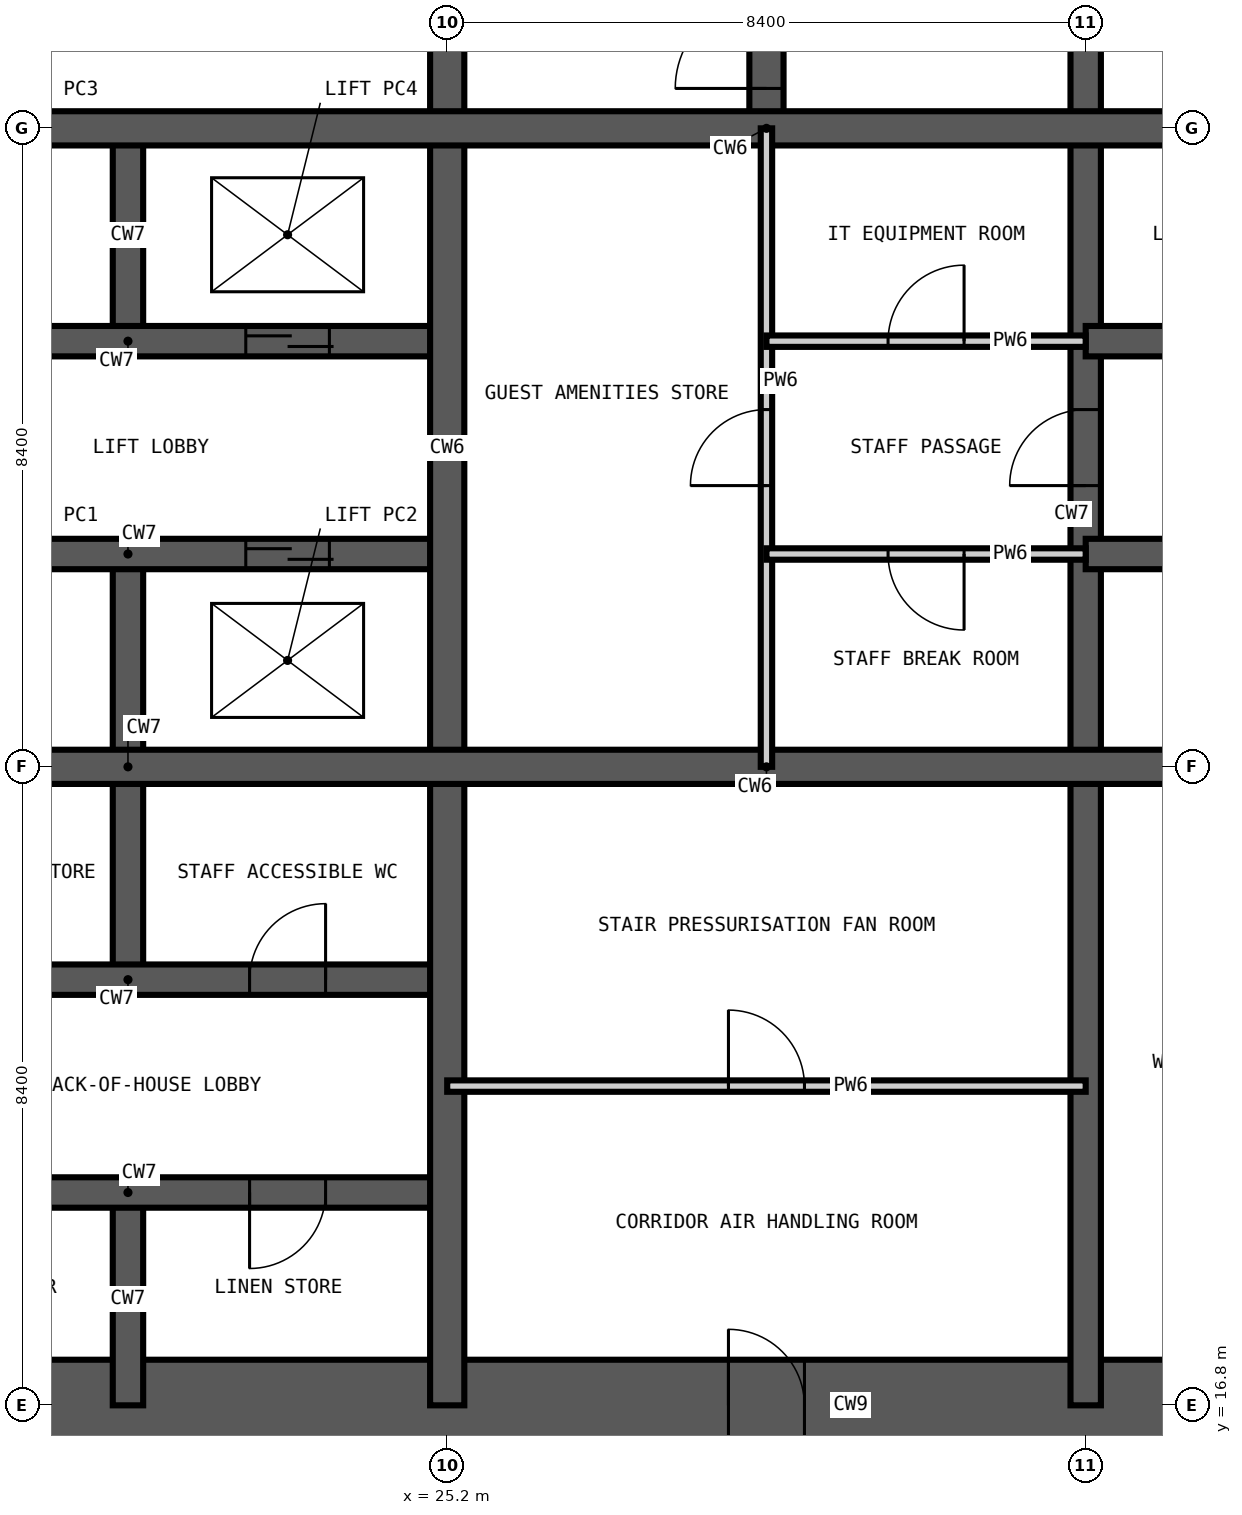
"""IFC4 building model, lengths in metres.
Left out: names, types, materials, properties, quantities, classifications, styles, units other than length and angle.
Written with IfcOpenShell. Run it as: python <this file> out.ifc"""

import sys

from ifc_helpers import new_model, si_unit, direction, frame, frame_2d, origin, place, context, subcontext, project, spatial, rectangle, extrude, element, fill, save


model = new_model("IFC4")
c1 = context("Model", 3, precision=1e-05, world=origin(), true_north=direction((0.0, 1.0)))
c2 = subcontext(c1, "Body", "Model", "MODEL_VIEW")
j1 = project(units=[si_unit("LENGTHUNIT", "METRE"), si_unit("PLANEANGLEUNIT", "RADIAN")], contexts=[c1])
p1 = place(None, origin())
s1 = spatial("IfcSite", under=j1, at=p1, CompositionType="ELEMENT")
p2 = place(p1, origin())
s2 = spatial("IfcBuilding", under=s1, at=p2, CompositionType="ELEMENT")
p3 = place(p2, frame((0.0, 0.0, 213.0)))
s3 = spatial("IfcBuildingStorey", under=s2, at=p3, CompositionType="ELEMENT", Elevation=213.0)
p4 = place(p3, frame((16.2, 16.8, -0.35), z_axis=(0.0, 0.0, 1.0), x_axis=(1.0, 0.0, 0.0)))
e1 = element("IfcWall", 1, at=p4, inside=s3, PredefinedType="SHEAR", context=c2, shape_type="SweptSolid", body=[
    extrude(rectangle(XDim=26.4, YDim=1.2, at=frame_2d((13.2, 0.0))), origin(), (0.0, 0.0, 1.0), 3.6),
])
p5 = place(p4, frame((12.7, 0.0, 0.35)))
e2 = element("IfcOpeningElement", 2, at=p5, cuts=e1, PredefinedType="OPENING", context=c2, shape_type="SweptSolid", body=[
    extrude(rectangle(XDim=1.0, YDim=2.1, at=frame_2d((0.5, 1.05))), frame((0.0, 0.61, 0.0), z_axis=(0.0, -1.0, 0.0), x_axis=(1.0, 0.0, 0.0)), (0.0, 0.0, 1.0), 1.22),
])
p6 = place(p4, frame((19.0, 0.0, 0.35)))
e3 = element("IfcOpeningElement", 3, at=p6, cuts=e1, PredefinedType="OPENING", context=c2, shape_type="SweptSolid", body=[
    extrude(rectangle(XDim=1.0, YDim=2.1, at=frame_2d((0.5, 1.05))), frame((0.0, 0.61, 0.0), z_axis=(0.0, -1.0, 0.0), x_axis=(1.0, 0.0, 0.0)), (0.0, 0.0, 1.0), 1.22),
])
p7 = place(p3, frame((21.0, 16.8, -0.35), z_axis=(0.0, 0.0, 1.0), x_axis=(0.0, 1.0, 0.0)))
e4 = element("IfcWall", 4, at=p7, inside=s3, PredefinedType="SHEAR", context=c2, shape_type="SweptSolid", body=[
    extrude(rectangle(XDim=2.8, YDim=0.4, at=frame_2d((1.4, 0.0))), origin(), (0.0, 0.0, 1.0), 3.6),
])
p8 = place(p3, frame((21.0, 22.4, -0.35), z_axis=(0.0, 0.0, 1.0), x_axis=(0.0, 1.0, 0.0)))
e5 = element("IfcWall", 5, at=p8, inside=s3, PredefinedType="SHEAR", context=c2, shape_type="SweptSolid", body=[
    extrude(rectangle(XDim=5.6, YDim=0.4, at=frame_2d((2.8, 0.0))), origin(), (0.0, 0.0, 1.0), 3.6),
])
p9 = place(p3, frame((21.0, 30.8, -0.35), z_axis=(0.0, 0.0, 1.0), x_axis=(0.0, 1.0, 0.0)))
e6 = element("IfcWall", 6, at=p9, inside=s3, PredefinedType="SHEAR", context=c2, shape_type="SweptSolid", body=[
    extrude(rectangle(XDim=2.8, YDim=0.4, at=frame_2d((1.4, 0.0))), origin(), (0.0, 0.0, 1.0), 3.6),
])
p10 = place(p3, frame((33.6, 16.8, -0.35), z_axis=(0.0, 0.0, 1.0), x_axis=(0.0, 1.0, 0.0)))
e7 = element("IfcWall", 7, at=p10, inside=s3, PredefinedType="SHEAR", context=c2, shape_type="SweptSolid", body=[
    extrude(rectangle(XDim=25.2, YDim=0.4, at=frame_2d((12.6, 0.0))), origin(), (0.0, 0.0, 1.0), 3.6),
])
p11 = place(p10, frame((22.5, 0.0, 0.35)))
e8 = element("IfcOpeningElement", 8, at=p11, cuts=e7, PredefinedType="OPENING", context=c2, shape_type="SweptSolid", body=[
    extrude(rectangle(XDim=1.2, YDim=2.2, at=frame_2d((0.6, 1.1))), frame((0.0, 0.21, 0.0), z_axis=(0.0, -1.0, 0.0), x_axis=(1.0, 0.0, 0.0)), (0.0, 0.0, 1.0), 0.42),
])
p12 = place(p10, frame((18.3, 0.0, 0.35)))
e9 = element("IfcOpeningElement", 9, at=p12, cuts=e7, PredefinedType="OPENING", context=c2, shape_type="SweptSolid", body=[
    extrude(rectangle(XDim=1.2, YDim=2.2, at=frame_2d((0.6, 1.1))), frame((0.0, 0.21, 0.0), z_axis=(0.0, -1.0, 0.0), x_axis=(1.0, 0.0, 0.0)), (0.0, 0.0, 1.0), 0.42),
])
p13 = place(p10, frame((12.1, 0.0, 0.35)))
e10 = element("IfcOpeningElement", 10, at=p13, cuts=e7, PredefinedType="OPENING", context=c2, shape_type="SweptSolid", body=[
    extrude(rectangle(XDim=1.0, YDim=2.1, at=frame_2d((0.5, 1.05))), frame((0.0, 0.21, 0.0), z_axis=(0.0, -1.0, 0.0), x_axis=(1.0, 0.0, 0.0)), (0.0, 0.0, 1.0), 0.42),
])
p14 = place(p3, frame((16.8, 19.6, -0.35), z_axis=(0.0, 0.0, 1.0), x_axis=(1.0, 0.0, 0.0)))
e11 = element("IfcWall", 11, at=p14, inside=s3, PredefinedType="SHEAR", context=c2, shape_type="SweptSolid", body=[
    extrude(rectangle(XDim=8.4, YDim=0.4, at=frame_2d((4.2, 0.0))), origin(), (0.0, 0.0, 1.0), 3.6),
])
p15 = place(p14, frame((1.6, 0.0, 0.35)))
e12 = element("IfcOpeningElement", 12, at=p15, cuts=e11, PredefinedType="OPENING", context=c2, shape_type="SweptSolid", body=[
    extrude(rectangle(XDim=1.0, YDim=2.1, at=frame_2d((0.5, 1.05))), frame((0.0, 0.21, 0.0), z_axis=(0.0, -1.0, 0.0), x_axis=(1.0, 0.0, 0.0)), (0.0, 0.0, 1.0), 0.42),
])
p16 = place(p14, frame((5.8, 0.0, 0.35)))
e13 = element("IfcOpeningElement", 13, at=p16, cuts=e11, PredefinedType="OPENING", context=c2, shape_type="SweptSolid", body=[
    extrude(rectangle(XDim=1.0, YDim=2.1, at=frame_2d((0.5, 1.05))), frame((0.0, 0.21, 0.0), z_axis=(0.0, -1.0, 0.0), x_axis=(1.0, 0.0, 0.0)), (0.0, 0.0, 1.0), 0.42),
])
p17 = place(p3, frame((16.8, 22.4, -0.35), z_axis=(0.0, 0.0, 1.0), x_axis=(1.0, 0.0, 0.0)))
e14 = element("IfcWall", 14, at=p17, inside=s3, PredefinedType="SHEAR", context=c2, shape_type="SweptSolid", body=[
    extrude(rectangle(XDim=8.4, YDim=0.4, at=frame_2d((4.2, 0.0))), origin(), (0.0, 0.0, 1.0), 3.6),
])
p18 = place(p17, frame((1.6, 0.0, 0.35)))
e15 = element("IfcOpeningElement", 15, at=p18, cuts=e14, PredefinedType="OPENING", context=c2, shape_type="SweptSolid", body=[
    extrude(rectangle(XDim=1.0, YDim=2.1, at=frame_2d((0.5, 1.05))), frame((0.0, 0.21, 0.0), z_axis=(0.0, -1.0, 0.0), x_axis=(1.0, 0.0, 0.0)), (0.0, 0.0, 1.0), 0.42),
])
p19 = place(p17, frame((5.8, 0.0, 0.35)))
e16 = element("IfcOpeningElement", 16, at=p19, cuts=e14, PredefinedType="OPENING", context=c2, shape_type="SweptSolid", body=[
    extrude(rectangle(XDim=1.0, YDim=2.1, at=frame_2d((0.5, 1.05))), frame((0.0, 0.21, 0.0), z_axis=(0.0, -1.0, 0.0), x_axis=(1.0, 0.0, 0.0)), (0.0, 0.0, 1.0), 0.42),
])
p20 = place(p3, frame((16.8, 28.0, -0.35), z_axis=(0.0, 0.0, 1.0), x_axis=(1.0, 0.0, 0.0)))
e17 = element("IfcWall", 17, at=p20, inside=s3, PredefinedType="SHEAR", context=c2, shape_type="SweptSolid", body=[
    extrude(rectangle(XDim=8.4, YDim=0.4, at=frame_2d((4.2, 0.0))), origin(), (0.0, 0.0, 1.0), 3.6),
])
p21 = place(p20, frame((1.55, 0.0, 0.35)))
e18 = element("IfcOpeningElement", 18, at=p21, cuts=e17, PredefinedType="OPENING", context=c2, shape_type="SweptSolid", body=[
    extrude(rectangle(XDim=1.1, YDim=2.2, at=frame_2d((0.55, 1.1))), frame((0.0, 0.21, 0.0), z_axis=(0.0, -1.0, 0.0), x_axis=(1.0, 0.0, 0.0)), (0.0, 0.0, 1.0), 0.42),
])
p22 = place(p20, frame((5.75, 0.0, 0.35)))
e19 = element("IfcOpeningElement", 19, at=p22, cuts=e17, PredefinedType="OPENING", context=c2, shape_type="SweptSolid", body=[
    extrude(rectangle(XDim=1.1, YDim=2.2, at=frame_2d((0.55, 1.1))), frame((0.0, 0.21, 0.0), z_axis=(0.0, -1.0, 0.0), x_axis=(1.0, 0.0, 0.0)), (0.0, 0.0, 1.0), 0.42),
])
p23 = place(p3, frame((33.6, 28.0, -0.35), z_axis=(0.0, 0.0, 1.0), x_axis=(1.0, 0.0, 0.0)))
e20 = element("IfcWall", 20, at=p23, inside=s3, PredefinedType="SHEAR", context=c2, shape_type="SweptSolid", body=[
    extrude(rectangle(XDim=8.4, YDim=0.4, at=frame_2d((4.2, 0.0))), origin(), (0.0, 0.0, 1.0), 3.6),
])
p24 = place(p23, frame((1.6, 0.0, 0.35)))
e21 = element("IfcOpeningElement", 21, at=p24, cuts=e20, PredefinedType="OPENING", context=c2, shape_type="SweptSolid", body=[
    extrude(rectangle(XDim=1.0, YDim=2.1, at=frame_2d((0.5, 1.05))), frame((0.0, 0.21, 0.0), z_axis=(0.0, -1.0, 0.0), x_axis=(1.0, 0.0, 0.0)), (0.0, 0.0, 1.0), 0.42),
])
p25 = place(p23, frame((4.6, 0.0, 0.35)))
e22 = element("IfcOpeningElement", 22, at=p25, cuts=e20, PredefinedType="OPENING", context=c2, shape_type="SweptSolid", body=[
    extrude(rectangle(XDim=1.0, YDim=2.1, at=frame_2d((0.5, 1.05))), frame((0.0, 0.21, 0.0), z_axis=(0.0, -1.0, 0.0), x_axis=(1.0, 0.0, 0.0)), (0.0, 0.0, 1.0), 0.42),
])
p26 = place(p3, frame((16.8, 30.8, -0.35), z_axis=(0.0, 0.0, 1.0), x_axis=(1.0, 0.0, 0.0)))
e23 = element("IfcWall", 23, at=p26, inside=s3, PredefinedType="SHEAR", context=c2, shape_type="SweptSolid", body=[
    extrude(rectangle(XDim=8.4, YDim=0.4, at=frame_2d((4.2, 0.0))), origin(), (0.0, 0.0, 1.0), 3.6),
])
p27 = place(p26, frame((1.55, 0.0, 0.35)))
e24 = element("IfcOpeningElement", 24, at=p27, cuts=e23, PredefinedType="OPENING", context=c2, shape_type="SweptSolid", body=[
    extrude(rectangle(XDim=1.1, YDim=2.2, at=frame_2d((0.55, 1.1))), frame((0.0, 0.21, 0.0), z_axis=(0.0, -1.0, 0.0), x_axis=(1.0, 0.0, 0.0)), (0.0, 0.0, 1.0), 0.42),
])
p28 = place(p26, frame((5.75, 0.0, 0.35)))
e25 = element("IfcOpeningElement", 25, at=p28, cuts=e23, PredefinedType="OPENING", context=c2, shape_type="SweptSolid", body=[
    extrude(rectangle(XDim=1.1, YDim=2.2, at=frame_2d((0.55, 1.1))), frame((0.0, 0.21, 0.0), z_axis=(0.0, -1.0, 0.0), x_axis=(1.0, 0.0, 0.0)), (0.0, 0.0, 1.0), 0.42),
])
p29 = place(p3, frame((33.6, 30.8, -0.35), z_axis=(0.0, 0.0, 1.0), x_axis=(1.0, 0.0, 0.0)))
e26 = element("IfcWall", 26, at=p29, inside=s3, PredefinedType="SHEAR", context=c2, shape_type="SweptSolid", body=[
    extrude(rectangle(XDim=8.4, YDim=0.4, at=frame_2d((4.2, 0.0))), origin(), (0.0, 0.0, 1.0), 3.6),
])
p30 = place(p3, frame((25.2, 16.8, -0.35), z_axis=(0.0, 0.0, 1.0), x_axis=(0.0, 1.0, 0.0)))
e27 = element("IfcWall", 27, at=p30, inside=s3, PredefinedType="SHEAR", context=c2, shape_type="SweptSolid", body=[
    extrude(rectangle(XDim=25.2, YDim=0.45, at=frame_2d((12.6, 0.0))), origin(), (0.0, 0.0, 1.0), 3.6),
])
p31 = place(p3, frame((29.4, 33.6, -0.35), z_axis=(0.0, 0.0, 1.0), x_axis=(0.0, 1.0, 0.0)))
e28 = element("IfcWall", 28, at=p31, inside=s3, PredefinedType="SHEAR", context=c2, shape_type="SweptSolid", body=[
    extrude(rectangle(XDim=8.4, YDim=0.45, at=frame_2d((4.2, 0.0))), origin(), (0.0, 0.0, 1.0), 3.6),
])
p32 = place(p31, frame((0.525, 0.0, 0.35)))
e29 = element("IfcOpeningElement", 29, at=p32, cuts=e28, PredefinedType="OPENING", context=c2, shape_type="SweptSolid", body=[
    extrude(rectangle(XDim=1.2, YDim=2.2, at=frame_2d((0.6, 1.1))), frame((0.0, 0.235, 0.0), z_axis=(0.0, -1.0, 0.0), x_axis=(1.0, 0.0, 0.0)), (0.0, 0.0, 1.0), 0.47),
])
for number, where, z_axis, x_axis in (
    (30, (16.8, 25.2, -0.35), (0.0, 0.0, 1.0), (1.0, 0.0, 0.0)),
    (31, (16.8, 33.6, -0.35), (0.0, 0.0, 1.0), (1.0, 0.0, 0.0)),
):
    element("IfcWall", number, at=place(p3, frame(where, z_axis=z_axis, x_axis=x_axis)), inside=s3, PredefinedType="SHEAR", context=c2, shape_type="SweptSolid", body=[
        extrude(rectangle(XDim=25.2, YDim=0.45, at=frame_2d((12.6, 0.0))), origin(), (0.0, 0.0, 1.0), 3.6),
    ])
p33 = place(p3, frame((29.4, 25.2, 0.0), z_axis=(0.0, 0.0, 1.0), x_axis=(0.0, 1.0, 0.0)))
e32 = element("IfcWall", 32, at=p33, inside=s3, PredefinedType="PARTITIONING", context=c2, shape_type="SweptSolid", body=[
    extrude(rectangle(XDim=8.4, YDim=0.15, at=frame_2d((4.2, 0.0))), origin(), (0.0, 0.0, 1.0), 3.25),
])
p34 = place(p33, frame((3.7, 0.0, 0.0)))
e33 = element("IfcOpeningElement", 33, at=p34, cuts=e32, PredefinedType="OPENING", context=c2, shape_type="SweptSolid", body=[
    extrude(rectangle(XDim=1.0, YDim=2.1, at=frame_2d((0.5, 1.05))), frame((0.0, 0.085, 0.0), z_axis=(0.0, -1.0, 0.0), x_axis=(1.0, 0.0, 0.0)), (0.0, 0.0, 1.0), 0.17),
])
p35 = place(p3, frame((25.2, 21.0, 0.0), z_axis=(0.0, 0.0, 1.0), x_axis=(1.0, 0.0, 0.0)))
e34 = element("IfcWall", 34, at=p35, inside=s3, PredefinedType="PARTITIONING", context=c2, shape_type="SweptSolid", body=[
    extrude(rectangle(XDim=8.4, YDim=0.15, at=frame_2d((4.2, 0.0))), origin(), (0.0, 0.0, 1.0), 3.25),
])
p36 = place(p35, frame((3.7, 0.0, 0.0)))
e35 = element("IfcOpeningElement", 35, at=p36, cuts=e34, PredefinedType="OPENING", context=c2, shape_type="SweptSolid", body=[
    extrude(rectangle(XDim=1.0, YDim=2.1, at=frame_2d((0.5, 1.05))), frame((0.0, 0.085, 0.0), z_axis=(0.0, -1.0, 0.0), x_axis=(1.0, 0.0, 0.0)), (0.0, 0.0, 1.0), 0.17),
])
p37 = place(p3, frame((29.4, 28.0, 0.0), z_axis=(0.0, 0.0, 1.0), x_axis=(1.0, 0.0, 0.0)))
e36 = element("IfcWall", 36, at=p37, inside=s3, PredefinedType="PARTITIONING", context=c2, shape_type="SweptSolid", body=[
    extrude(rectangle(XDim=4.2, YDim=0.15, at=frame_2d((2.1, 0.0))), origin(), (0.0, 0.0, 1.0), 3.25),
])
p38 = place(p37, frame((1.6, 0.0, 0.0)))
e37 = element("IfcOpeningElement", 37, at=p38, cuts=e36, PredefinedType="OPENING", context=c2, shape_type="SweptSolid", body=[
    extrude(rectangle(XDim=1.0, YDim=2.1, at=frame_2d((0.5, 1.05))), frame((0.0, 0.085, 0.0), z_axis=(0.0, -1.0, 0.0), x_axis=(1.0, 0.0, 0.0)), (0.0, 0.0, 1.0), 0.17),
])
p39 = place(p3, frame((29.4, 30.8, 0.0), z_axis=(0.0, 0.0, 1.0), x_axis=(1.0, 0.0, 0.0)))
e38 = element("IfcWall", 38, at=p39, inside=s3, PredefinedType="PARTITIONING", context=c2, shape_type="SweptSolid", body=[
    extrude(rectangle(XDim=4.2, YDim=0.15, at=frame_2d((2.1, 0.0))), origin(), (0.0, 0.0, 1.0), 3.25),
])
p40 = place(p39, frame((1.6, 0.0, 0.0)))
e39 = element("IfcOpeningElement", 39, at=p40, cuts=e38, PredefinedType="OPENING", context=c2, shape_type="SweptSolid", body=[
    extrude(rectangle(XDim=1.0, YDim=2.1, at=frame_2d((0.5, 1.05))), frame((0.0, 0.085, 0.0), z_axis=(0.0, -1.0, 0.0), x_axis=(1.0, 0.0, 0.0)), (0.0, 0.0, 1.0), 0.17),
])
p41 = place(p32, origin())
e40 = element("IfcDoor", 40, at=p41, inside=s3, OperationType="SINGLE_SWING_LEFT", PredefinedType="DOOR", context=c2, shape_type="SweptSolid", body=[
    extrude(rectangle(XDim=1.2, YDim=2.2, at=frame_2d((0.6, 1.1))), frame((0.0, 0.025, 0.0), z_axis=(0.0, -1.0, 0.0), x_axis=(1.0, 0.0, 0.0)), (0.0, 0.0, 1.0), 0.05),
])
fill(e29, e40)
p42 = place(p22, origin())
e41 = element("IfcDoor", 41, at=p42, inside=s3, OperationType="DOUBLE_DOOR_SLIDING", PredefinedType="DOOR", context=c2, shape_type="SweptSolid", body=[
    extrude(rectangle(XDim=1.1, YDim=2.2, at=frame_2d((0.55, 1.1))), frame((0.0, 0.025, 0.0), z_axis=(0.0, -1.0, 0.0), x_axis=(1.0, 0.0, 0.0)), (0.0, 0.0, 1.0), 0.05),
])
fill(e19, e41)
p43 = place(p28, origin())
e42 = element("IfcDoor", 42, at=p43, inside=s3, OperationType="DOUBLE_DOOR_SLIDING", PredefinedType="DOOR", context=c2, shape_type="SweptSolid", body=[
    extrude(rectangle(XDim=1.1, YDim=2.2, at=frame_2d((0.55, 1.1))), frame((0.0, 0.025, 0.0), z_axis=(0.0, -1.0, 0.0), x_axis=(1.0, 0.0, 0.0)), (0.0, 0.0, 1.0), 0.05),
])
fill(e25, e42)
p44 = place(p16, frame((1.0, 0.0, 0.0), z_axis=(0.0, 0.0, 1.0), x_axis=(-1.0, 0.0, 0.0)))
e43 = element("IfcDoor", 43, at=p44, inside=s3, OperationType="SINGLE_SWING_RIGHT", PredefinedType="DOOR", context=c2, shape_type="SweptSolid", body=[
    extrude(rectangle(XDim=1.0, YDim=2.1, at=frame_2d((0.5, 1.05))), frame((0.0, 0.025, 0.0), z_axis=(0.0, -1.0, 0.0), x_axis=(1.0, 0.0, 0.0)), (0.0, 0.0, 1.0), 0.05),
])
fill(e13, e43)
p45 = place(p19, origin())
e44 = element("IfcDoor", 44, at=p45, inside=s3, OperationType="SINGLE_SWING_RIGHT", PredefinedType="DOOR", context=c2, shape_type="SweptSolid", body=[
    extrude(rectangle(XDim=1.0, YDim=2.1, at=frame_2d((0.5, 1.05))), frame((0.0, 0.025, 0.0), z_axis=(0.0, -1.0, 0.0), x_axis=(1.0, 0.0, 0.0)), (0.0, 0.0, 1.0), 0.05),
])
fill(e16, e44)
p46 = place(p13, origin())
e45 = element("IfcDoor", 45, at=p46, inside=s3, OperationType="SINGLE_SWING_LEFT", PredefinedType="DOOR", context=c2, shape_type="SweptSolid", body=[
    extrude(rectangle(XDim=1.0, YDim=2.1, at=frame_2d((0.5, 1.05))), frame((0.0, 0.025, 0.0), z_axis=(0.0, -1.0, 0.0), x_axis=(1.0, 0.0, 0.0)), (0.0, 0.0, 1.0), 0.05),
])
fill(e10, e45)
p47 = place(p38, frame((1.0, 0.0, 0.0), z_axis=(0.0, 0.0, 1.0), x_axis=(-1.0, 0.0, 0.0)))
e46 = element("IfcDoor", 46, at=p47, inside=s3, OperationType="SINGLE_SWING_LEFT", PredefinedType="DOOR", context=c2, shape_type="SweptSolid", body=[
    extrude(rectangle(XDim=1.0, YDim=2.1, at=frame_2d((0.5, 1.05))), frame((0.0, 0.025, 0.0), z_axis=(0.0, -1.0, 0.0), x_axis=(1.0, 0.0, 0.0)), (0.0, 0.0, 1.0), 0.05),
])
fill(e37, e46)
p48 = place(p40, origin())
e47 = element("IfcDoor", 47, at=p48, inside=s3, OperationType="SINGLE_SWING_RIGHT", PredefinedType="DOOR", context=c2, shape_type="SweptSolid", body=[
    extrude(rectangle(XDim=1.0, YDim=2.1, at=frame_2d((0.5, 1.05))), frame((0.0, 0.025, 0.0), z_axis=(0.0, -1.0, 0.0), x_axis=(1.0, 0.0, 0.0)), (0.0, 0.0, 1.0), 0.05),
])
fill(e39, e47)
p49 = place(p34, origin())
e48 = element("IfcDoor", 48, at=p49, inside=s3, OperationType="SINGLE_SWING_LEFT", PredefinedType="DOOR", context=c2, shape_type="SweptSolid", body=[
    extrude(rectangle(XDim=1.0, YDim=2.1, at=frame_2d((0.5, 1.05))), frame((0.0, 0.025, 0.0), z_axis=(0.0, -1.0, 0.0), x_axis=(1.0, 0.0, 0.0)), (0.0, 0.0, 1.0), 0.05),
])
fill(e33, e48)
p50 = place(p5, origin())
e49 = element("IfcDoor", 49, at=p50, inside=s3, OperationType="SINGLE_SWING_LEFT", PredefinedType="DOOR", context=c2, shape_type="SweptSolid", body=[
    extrude(rectangle(XDim=1.0, YDim=2.1, at=frame_2d((0.5, 1.05))), frame((0.0, 0.025, 0.0), z_axis=(0.0, -1.0, 0.0), x_axis=(1.0, 0.0, 0.0)), (0.0, 0.0, 1.0), 0.05),
])
fill(e2, e49)
p51 = place(p36, origin())
e50 = element("IfcDoor", 50, at=p51, inside=s3, OperationType="SINGLE_SWING_LEFT", PredefinedType="DOOR", context=c2, shape_type="SweptSolid", body=[
    extrude(rectangle(XDim=1.0, YDim=2.1, at=frame_2d((0.5, 1.05))), frame((0.0, 0.025, 0.0), z_axis=(0.0, -1.0, 0.0), x_axis=(1.0, 0.0, 0.0)), (0.0, 0.0, 1.0), 0.05),
])
fill(e35, e50)
save(model, sys.argv[1])
